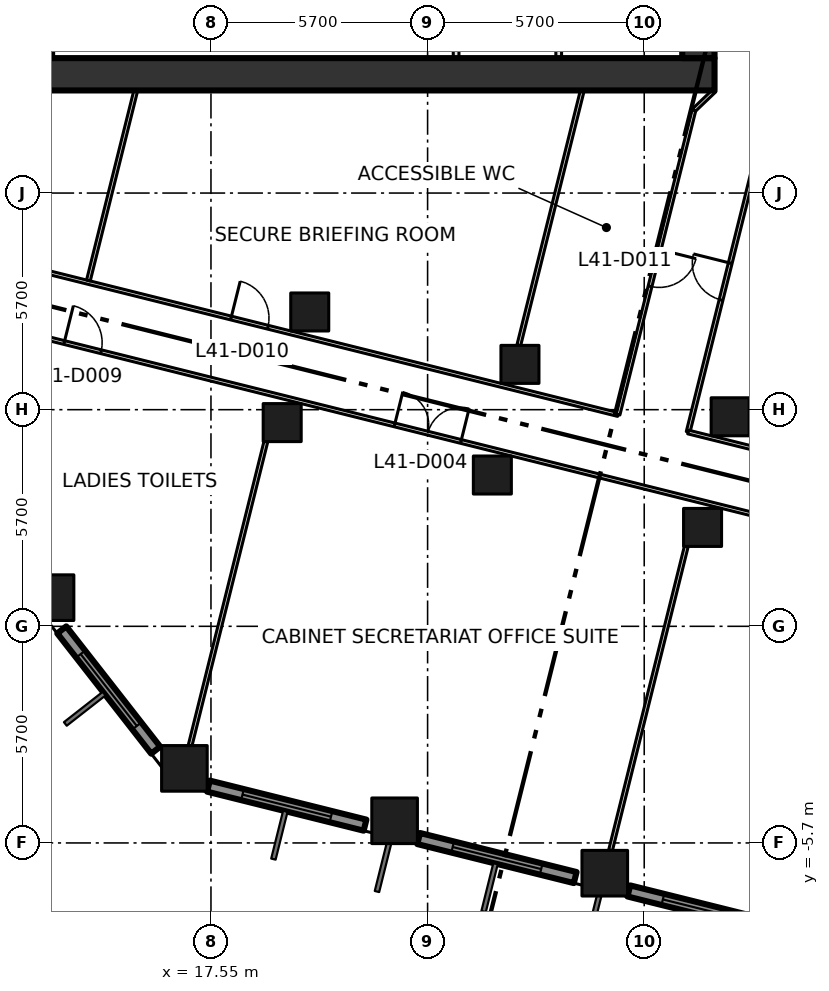
"""IFC4 building model, lengths in metres.
Left out: names, types, materials, properties, quantities, classifications, styles, units other than length and angle.
Written with IfcOpenShell. Run it as: python <this file> out.ifc"""

import sys

from ifc_helpers import new_model, si_unit, direction, frame, frame_2d, origin, origin_2d, place, context, subcontext, project, spatial, rectangle, extrude, element, fill, save


model = new_model("IFC4")
c1 = context("Model", 3, precision=1e-05, world=origin(), true_north=direction((0.0, 1.0)))
c2 = subcontext(c1, "Body", "Model", "MODEL_VIEW")
j1 = project(units=[si_unit("LENGTHUNIT", "METRE"), si_unit("PLANEANGLEUNIT", "RADIAN")], contexts=[c1])
p1 = place(None, origin())
s1 = spatial("IfcSite", under=j1, at=p1, CompositionType="ELEMENT")
p2 = place(p1, origin())
s2 = spatial("IfcBuilding", under=s1, at=p2, CompositionType="ELEMENT")
p3 = place(p2, frame((0.0, 0.0, 182.4)))
s3 = spatial("IfcBuildingStorey", under=s2, at=p3, CompositionType="ELEMENT", Elevation=182.4)
for number, where, z_axis, x_axis in (
    (1, (16.851, -3.738, 0.0), (0.0, 0.0, 1.0), (1.0, 0.0, 0.0)),
    (2, (13.342, 0.754, 0.0), (0.0, 0.0, 1.0), (1.0, 0.0, 0.0)),
    (3, (22.382, -5.117, 0.0), (0.0, 0.0, 1.0), (1.0, 0.0, 0.0)),
    (4, (27.912, -6.496, 0.0), (0.0, 0.0, 1.0), (1.0, 0.0, 0.0)),
):
    element("IfcColumn", number, at=place(p3, frame(where, z_axis=z_axis, x_axis=x_axis)), inside=s3, PredefinedType="COLUMN", context=c2, shape_type="SweptSolid", body=[
        extrude(rectangle(XDim=1.2, YDim=1.2, at=origin_2d()), origin(), (0.0, 0.0, 1.0), 4.2),
    ])
for number, where, z_axis, x_axis in (
    (5, (19.424, 5.36, 0.0), (0.0, 0.0, 1.0), (1.0, 0.0, 0.0)),
    (6, (24.954, 3.981, 0.0), (0.0, 0.0, 1.0), (1.0, 0.0, 0.0)),
    (7, (30.485, 2.602, 0.0), (0.0, 0.0, 1.0), (1.0, 0.0, 0.0)),
    (8, (20.149, 8.271, 0.0), (0.0, 0.0, 1.0), (1.0, 0.0, 0.0)),
    (9, (25.68, 6.892, 0.0), (0.0, 0.0, 1.0), (1.0, 0.0, 0.0)),
    (10, (31.211, 5.513, 0.0), (0.0, 0.0, 1.0), (1.0, 0.0, 0.0)),
):
    element("IfcColumn", number, at=place(p3, frame(where, z_axis=z_axis, x_axis=x_axis)), inside=s3, PredefinedType="COLUMN", context=c2, shape_type="SweptSolid", body=[
        extrude(rectangle(XDim=1.0, YDim=1.0, at=origin_2d()), origin(), (0.0, 0.0, 1.0), 4.2),
    ])
p4 = place(p3, frame((8.0, 14.525, -0.3), z_axis=(0.0, 0.0, 1.0), x_axis=(1.0, 0.0, 0.0)))
e11 = element("IfcWall", 11, at=p4, inside=s3, PredefinedType="SHEAR", context=c2, shape_type="SweptSolid", body=[
    extrude(rectangle(XDim=22.8, YDim=0.85, at=frame_2d((11.4, 0.0))), origin(), (0.0, 0.0, 1.0), 4.2),
])
p5 = place(p4, frame((2.3, 0.0, 0.3)))
e12 = element("IfcOpeningElement", 12, at=p5, cuts=e11, PredefinedType="OPENING", context=c2, shape_type="SweptSolid", body=[
    extrude(rectangle(XDim=1.8, YDim=2.1, at=frame_2d((0.9, 1.05))), frame((0.0, 0.435, 0.0), z_axis=(0.0, -1.0, 0.0), x_axis=(1.0, 0.0, 0.0)), (0.0, 0.0, 1.0), 0.87),
])
p6 = place(p3, frame((30.375, 14.95, -0.3), z_axis=(0.0, 0.0, 1.0), x_axis=(0.0, 1.0, 0.0)))
e13 = element("IfcWall", 13, at=p6, inside=s3, PredefinedType="SHEAR", context=c2, shape_type="SweptSolid", body=[
    extrude(rectangle(XDim=20.75, YDim=0.85, at=frame_2d((10.375, 0.0))), origin(), (0.0, 0.0, 1.0), 4.2),
])
for number, where, z_axis, x_axis in (
    (14, (24.0, 14.95, 0.0), (0.0, 0.0, 1.0), (0.0, 1.0, 0.0)),
    (15, (26.7, 14.95, 0.0), (0.0, 0.0, 1.0), (0.0, 1.0, 0.0)),
):
    element("IfcWall", number, at=place(p3, frame(where, z_axis=z_axis, x_axis=x_axis)), inside=s3, PredefinedType="PARTITIONING", context=c2, shape_type="SweptSolid", body=[
        extrude(rectangle(XDim=2.675, YDim=0.15, at=frame_2d((1.337, 0.0))), origin(), (0.0, 0.0, 1.0), 3.9),
    ])
p7 = place(p3, frame((13.624, -0.094, 0.0), z_axis=(0.0, 0.0, 1.0), x_axis=(0.615526062586, -0.7881165309, 0.0)))
e16 = element("IfcWall", 16, at=p7, inside=s3, PredefinedType="SOLIDWALL", context=c2, shape_type="SweptSolid", body=[
    extrude(rectangle(XDim=4.016, YDim=0.3, at=frame_2d((2.008, 0.0))), origin(), (0.0, 0.0, 1.0), 3.15),
])
p8 = place(p7, frame((0.808, 0.0, 0.8)))
e17 = element("IfcOpeningElement", 17, at=p8, cuts=e16, PredefinedType="OPENING", context=c2, shape_type="SweptSolid", body=[
    extrude(rectangle(XDim=2.4, YDim=2.1, at=frame_2d((1.2, 1.05))), frame((0.0, 0.16, 0.0), z_axis=(0.0, -1.0, 0.0), x_axis=(1.0, 0.0, 0.0)), (0.0, 0.0, 1.0), 0.32),
])
p9 = place(p3, frame((17.484, -4.205, 0.0), z_axis=(0.0, 0.0, 1.0), x_axis=(0.970318118028, -0.241832069473, 0.0)))
e18 = element("IfcWall", 18, at=p9, inside=s3, PredefinedType="SOLIDWALL", context=c2, shape_type="SweptSolid", body=[
    extrude(rectangle(XDim=4.246, YDim=0.3, at=frame_2d((2.123, 0.0))), origin(), (0.0, 0.0, 1.0), 3.15),
])
p10 = place(p9, frame((0.923, 0.0, 0.8)))
e19 = element("IfcOpeningElement", 19, at=p10, cuts=e18, PredefinedType="OPENING", context=c2, shape_type="SweptSolid", body=[
    extrude(rectangle(XDim=2.4, YDim=2.1, at=frame_2d((1.2, 1.05))), frame((0.0, 0.16, 0.0), z_axis=(0.0, -1.0, 0.0), x_axis=(1.0, 0.0, 0.0)), (0.0, 0.0, 1.0), 0.32),
])
p11 = place(p3, frame((23.015, -5.584, 0.0), z_axis=(0.0, 0.0, 1.0), x_axis=(0.970291164166, -0.241940192487, 0.0)))
e20 = element("IfcWall", 20, at=p11, inside=s3, PredefinedType="SOLIDWALL", context=c2, shape_type="SweptSolid", body=[
    extrude(rectangle(XDim=4.245, YDim=0.3, at=frame_2d((2.123, 0.0))), origin(), (0.0, 0.0, 1.0), 3.15),
])
p12 = place(p11, frame((0.922, 0.0, 0.8)))
e21 = element("IfcOpeningElement", 21, at=p12, cuts=e20, PredefinedType="OPENING", context=c2, shape_type="SweptSolid", body=[
    extrude(rectangle(XDim=2.4, YDim=2.1, at=frame_2d((1.2, 1.05))), frame((0.0, 0.16, 0.0), z_axis=(0.0, -1.0, 0.0), x_axis=(1.0, 0.0, 0.0)), (0.0, 0.0, 1.0), 0.32),
])
p13 = place(p3, frame((28.545, -6.963, 0.0), z_axis=(0.0, 0.0, 1.0), x_axis=(0.97030462482, -0.241886202691, 0.0)))
e22 = element("IfcWall", 22, at=p13, inside=s3, PredefinedType="SOLIDWALL", context=c2, shape_type="SweptSolid", body=[
    extrude(rectangle(XDim=4.246, YDim=0.3, at=frame_2d((2.123, 0.0))), origin(), (0.0, 0.0, 1.0), 3.15),
])
p14 = place(p13, frame((0.923, 0.0, 0.8)))
e23 = element("IfcOpeningElement", 23, at=p14, cuts=e22, PredefinedType="OPENING", context=c2, shape_type="SweptSolid", body=[
    extrude(rectangle(XDim=2.4, YDim=2.1, at=frame_2d((1.2, 1.05))), frame((0.0, 0.16, 0.0), z_axis=(0.0, -1.0, 0.0), x_axis=(1.0, 0.0, 0.0)), (0.0, 0.0, 1.0), 0.32),
])
p15 = place(p3, frame((8.565, 8.744, 0.0), z_axis=(0.0, 0.0, 1.0), x_axis=(0.97029693432, -0.24191705035, 0.0)))
e24 = element("IfcWall", 24, at=p15, inside=s3, PredefinedType="PARTITIONING", context=c2, shape_type="SweptSolid", body=[
    extrude(rectangle(XDim=56.375, YDim=0.1, at=frame_2d((28.187, 0.0))), origin(), (0.0, 0.0, 1.0), 3.9),
])
p16 = place(p15, frame((42.739, 0.0, 0.0)))
e25 = element("IfcOpeningElement", 25, at=p16, cuts=e24, PredefinedType="OPENING", context=c2, shape_type="SweptSolid", body=[
    extrude(rectangle(XDim=1.8, YDim=2.1, at=frame_2d((0.9, 1.05))), frame((0.0, 0.06, 0.0), z_axis=(0.0, -1.0, 0.0), x_axis=(1.0, 0.0, 0.0)), (0.0, 0.0, 1.0), 0.12),
])
p17 = place(p15, frame((14.239, 0.0, 0.0)))
e26 = element("IfcOpeningElement", 26, at=p17, cuts=e24, PredefinedType="OPENING", context=c2, shape_type="SweptSolid", body=[
    extrude(rectangle(XDim=1.8, YDim=2.1, at=frame_2d((0.9, 1.05))), frame((0.0, 0.06, 0.0), z_axis=(0.0, -1.0, 0.0), x_axis=(1.0, 0.0, 0.0)), (0.0, 0.0, 1.0), 0.12),
])
p18 = place(p15, frame((29.74, 0.0, 0.0)))
e27 = element("IfcOpeningElement", 27, at=p18, cuts=e24, PredefinedType="OPENING", context=c2, shape_type="SweptSolid", body=[
    extrude(rectangle(XDim=1.8, YDim=2.1, at=frame_2d((0.9, 1.05))), frame((0.0, 0.06, 0.0), z_axis=(0.0, -1.0, 0.0), x_axis=(1.0, 0.0, 0.0)), (0.0, 0.0, 1.0), 0.12),
])
p19 = place(p15, frame((35.64, 0.0, 0.0)))
e28 = element("IfcOpeningElement", 28, at=p19, cuts=e24, PredefinedType="OPENING", context=c2, shape_type="SweptSolid", body=[
    extrude(rectangle(XDim=1.0, YDim=2.1, at=frame_2d((0.5, 1.05))), frame((0.0, 0.06, 0.0), z_axis=(0.0, -1.0, 0.0), x_axis=(1.0, 0.0, 0.0)), (0.0, 0.0, 1.0), 0.12),
])
p20 = place(p15, frame((5.28, 0.0, 0.0)))
e29 = element("IfcOpeningElement", 29, at=p20, cuts=e24, PredefinedType="OPENING", context=c2, shape_type="SweptSolid", body=[
    extrude(rectangle(XDim=1.0, YDim=2.1, at=frame_2d((0.5, 1.05))), frame((0.0, 0.06, 0.0), z_axis=(0.0, -1.0, 0.0), x_axis=(1.0, 0.0, 0.0)), (0.0, 0.0, 1.0), 0.12),
])
p21 = place(p3, frame((8.973, 10.382, 0.0), z_axis=(0.0, 0.0, 1.0), x_axis=(0.970286808807, -0.241957658808, 0.0)))
e30 = element("IfcWall", 30, at=p21, inside=s3, PredefinedType="PARTITIONING", context=c2, shape_type="SweptSolid", body=[
    extrude(rectangle(XDim=19.88, YDim=0.1, at=frame_2d((9.94, 0.0))), origin(), (0.0, 0.0, 1.0), 3.9),
])
p22 = place(p21, frame((9.384, 0.0, 0.0)))
e31 = element("IfcOpeningElement", 31, at=p22, cuts=e30, PredefinedType="OPENING", context=c2, shape_type="SweptSolid", body=[
    extrude(rectangle(XDim=1.0, YDim=2.1, at=frame_2d((0.5, 1.05))), frame((0.0, 0.06, 0.0), z_axis=(0.0, -1.0, 0.0), x_axis=(1.0, 0.0, 0.0)), (0.0, 0.0, 1.0), 0.12),
])
p23 = place(p3, frame((30.105, 5.113, 0.0), z_axis=(0.0, 0.0, 1.0), x_axis=(0.241984285369, 0.970280168629, 0.0)))
e32 = element("IfcWall", 32, at=p23, inside=s3, PredefinedType="PARTITIONING", context=c2, shape_type="SweptSolid", body=[
    extrude(rectangle(XDim=8.232, YDim=0.1, at=frame_2d((4.116, 0.0))), origin(), (0.0, 0.0, 1.0), 3.9),
])
p24 = place(p23, frame((3.58, 0.0, 0.0)))
e33 = element("IfcOpeningElement", 33, at=p24, cuts=e32, PredefinedType="OPENING", context=c2, shape_type="SweptSolid", body=[
    extrude(rectangle(XDim=1.0, YDim=2.1, at=frame_2d((0.5, 1.05))), frame((0.0, 0.06, 0.0), z_axis=(0.0, -1.0, 0.0), x_axis=(1.0, 0.0, 0.0)), (0.0, 0.0, 1.0), 0.12),
])
p25 = place(p3, frame((30.259, 13.583, 0.0), z_axis=(0.0, 0.0, 1.0), x_axis=(-0.241888494143, -0.970304053584, 0.0)))
e34 = element("IfcWall", 34, at=p25, inside=s3, PredefinedType="PARTITIONING", context=c2, shape_type="SweptSolid", body=[
    extrude(rectangle(XDim=8.256, YDim=0.1, at=frame_2d((4.128, 0.0))), origin(), (0.0, 0.0, 1.0), 3.9),
])
p26 = place(p25, frame((3.78, 0.0, 0.0)))
e35 = element("IfcOpeningElement", 35, at=p26, cuts=e34, PredefinedType="OPENING", context=c2, shape_type="SweptSolid", body=[
    extrude(rectangle(XDim=1.0, YDim=2.1, at=frame_2d((0.5, 1.05))), frame((0.0, 0.06, 0.0), z_axis=(0.0, -1.0, 0.0), x_axis=(1.0, 0.0, 0.0)), (0.0, 0.0, 1.0), 0.12),
])
p27 = place(p3, frame((30.8, 14.1, 0.0), z_axis=(0.0, 0.0, 1.0), x_axis=(-0.722911025189, -0.690941133281, 0.0)))
e36 = element("IfcWall", 36, at=p27, inside=s3, PredefinedType="PARTITIONING", context=c2, shape_type="SweptSolid", body=[
    extrude(rectangle(XDim=0.748, YDim=0.1, at=frame_2d((0.374, 0.0))), origin(), (0.0, 0.0, 1.0), 3.9),
])
p28 = place(p3, frame((49.536, 0.268, 0.0), z_axis=(0.0, 0.0, 1.0), x_axis=(-0.970292195994, 0.241936054348, 0.0)))
e37 = element("IfcWall", 37, at=p28, inside=s3, PredefinedType="PARTITIONING", context=c2, shape_type="SweptSolid", body=[
    extrude(rectangle(XDim=20.026, YDim=0.1, at=frame_2d((10.013, 0.0))), origin(), (0.0, 0.0, 1.0), 3.9),
])
p29 = place(p28, frame((9.18, 0.0, 0.0)))
e38 = element("IfcOpeningElement", 38, at=p29, cuts=e37, PredefinedType="OPENING", context=c2, shape_type="SweptSolid", body=[
    extrude(rectangle(XDim=1.8, YDim=2.1, at=frame_2d((0.9, 1.05))), frame((0.0, 0.06, 0.0), z_axis=(0.0, -1.0, 0.0), x_axis=(1.0, 0.0, 0.0)), (0.0, 0.0, 1.0), 0.12),
])
p30 = place(p3, frame((14.325, 9.099, 0.0), z_axis=(0.0, 0.0, 1.0), x_axis=(0.241956019685, 0.970287217548, 0.0)))
e39 = element("IfcWall", 39, at=p30, inside=s3, PredefinedType="PARTITIONING", context=c2, shape_type="SweptSolid", body=[
    extrude(rectangle(XDim=5.154, YDim=0.1, at=frame_2d((2.577, 0.0))), origin(), (0.0, 0.0, 1.0), 3.9),
])
p31 = place(p3, frame((17.001, -3.138, 0.0), z_axis=(0.0, 0.0, 1.0), x_axis=(0.241922303467, 0.970295624583, 0.0)))
e40 = element("IfcWall", 40, at=p31, inside=s3, PredefinedType="PARTITIONING", context=c2, shape_type="SweptSolid", body=[
    extrude(rectangle(XDim=8.243, YDim=0.1, at=frame_2d((4.122, 0.0))), origin(), (0.0, 0.0, 1.0), 3.9),
])
p32 = place(p3, frame((25.649, 7.392, 0.0), z_axis=(0.0, 0.0, 1.0), x_axis=(0.241870819599, 0.970308459525, 0.0)))
e41 = element("IfcWall", 41, at=p32, inside=s3, PredefinedType="PARTITIONING", context=c2, shape_type="SweptSolid", body=[
    extrude(rectangle(XDim=6.913, YDim=0.1, at=frame_2d((3.457, 0.0))), origin(), (0.0, 0.0, 1.0), 3.9),
])
p33 = place(p3, frame((28.063, -5.896, 0.0), z_axis=(0.0, 0.0, 1.0), x_axis=(0.241894418317, 0.970302576719, 0.0)))
e42 = element("IfcWall", 42, at=p33, inside=s3, PredefinedType="PARTITIONING", context=c2, shape_type="SweptSolid", body=[
    extrude(rectangle(XDim=8.243, YDim=0.1, at=frame_2d((4.122, 0.0))), origin(), (0.0, 0.0, 1.0), 3.9),
])
p34 = place(p8, origin())
e43 = element("IfcWindow", 43, at=p34, inside=s3, PartitioningType="DOUBLE_PANEL_VERTICAL", PredefinedType="WINDOW", context=c2, shape_type="SweptSolid", body=[
    extrude(rectangle(XDim=2.4, YDim=2.1, at=frame_2d((1.2, 1.05))), frame((0.0, 0.03, 0.0), z_axis=(0.0, -1.0, 0.0), x_axis=(1.0, 0.0, 0.0)), (0.0, 0.0, 1.0), 0.06),
])
fill(e17, e43)
p35 = place(p10, origin())
e44 = element("IfcWindow", 44, at=p35, inside=s3, PartitioningType="DOUBLE_PANEL_VERTICAL", PredefinedType="WINDOW", context=c2, shape_type="SweptSolid", body=[
    extrude(rectangle(XDim=2.4, YDim=2.1, at=frame_2d((1.2, 1.05))), frame((0.0, 0.03, 0.0), z_axis=(0.0, -1.0, 0.0), x_axis=(1.0, 0.0, 0.0)), (0.0, 0.0, 1.0), 0.06),
])
fill(e19, e44)
p36 = place(p12, origin())
e45 = element("IfcWindow", 45, at=p36, inside=s3, PartitioningType="DOUBLE_PANEL_VERTICAL", PredefinedType="WINDOW", context=c2, shape_type="SweptSolid", body=[
    extrude(rectangle(XDim=2.4, YDim=2.1, at=frame_2d((1.2, 1.05))), frame((0.0, 0.03, 0.0), z_axis=(0.0, -1.0, 0.0), x_axis=(1.0, 0.0, 0.0)), (0.0, 0.0, 1.0), 0.06),
])
fill(e21, e45)
p37 = place(p14, origin())
e46 = element("IfcWindow", 46, at=p37, inside=s3, PartitioningType="DOUBLE_PANEL_VERTICAL", PredefinedType="WINDOW", context=c2, shape_type="SweptSolid", body=[
    extrude(rectangle(XDim=2.4, YDim=2.1, at=frame_2d((1.2, 1.05))), frame((0.0, 0.03, 0.0), z_axis=(0.0, -1.0, 0.0), x_axis=(1.0, 0.0, 0.0)), (0.0, 0.0, 1.0), 0.06),
])
fill(e23, e46)
p38 = place(p17, origin())
e47 = element("IfcDoor", 47, at=p38, inside=s3, OperationType="DOUBLE_DOOR_SINGLE_SWING", PredefinedType="DOOR", context=c2, shape_type="SweptSolid", body=[
    extrude(rectangle(XDim=1.8, YDim=2.1, at=frame_2d((0.9, 1.05))), frame((0.0, 0.025, 0.0), z_axis=(0.0, -1.0, 0.0), x_axis=(1.0, 0.0, 0.0)), (0.0, 0.0, 1.0), 0.05),
])
fill(e26, e47)
p39 = place(p20, origin())
e48 = element("IfcDoor", 48, at=p39, inside=s3, OperationType="SINGLE_SWING_LEFT", PredefinedType="DOOR", context=c2, shape_type="SweptSolid", body=[
    extrude(rectangle(XDim=1.0, YDim=2.1, at=frame_2d((0.5, 1.05))), frame((0.0, 0.025, 0.0), z_axis=(0.0, -1.0, 0.0), x_axis=(1.0, 0.0, 0.0)), (0.0, 0.0, 1.0), 0.05),
])
fill(e29, e48)
p40 = place(p22, origin())
e49 = element("IfcDoor", 49, at=p40, inside=s3, OperationType="SINGLE_SWING_LEFT", PredefinedType="DOOR", context=c2, shape_type="SweptSolid", body=[
    extrude(rectangle(XDim=1.0, YDim=2.1, at=frame_2d((0.5, 1.05))), frame((0.0, 0.025, 0.0), z_axis=(0.0, -1.0, 0.0), x_axis=(1.0, 0.0, 0.0)), (0.0, 0.0, 1.0), 0.05),
])
fill(e31, e49)
p41 = place(p26, origin())
e50 = element("IfcDoor", 50, at=p41, inside=s3, OperationType="SINGLE_SWING_LEFT", PredefinedType="DOOR", context=c2, shape_type="SweptSolid", body=[
    extrude(rectangle(XDim=1.0, YDim=2.1, at=frame_2d((0.5, 1.05))), frame((0.0, 0.025, 0.0), z_axis=(0.0, -1.0, 0.0), x_axis=(1.0, 0.0, 0.0)), (0.0, 0.0, 1.0), 0.05),
])
fill(e35, e50)
p42 = place(p24, origin())
e51 = element("IfcDoor", 51, at=p42, inside=s3, OperationType="SINGLE_SWING_RIGHT", PredefinedType="DOOR", context=c2, shape_type="SweptSolid", body=[
    extrude(rectangle(XDim=1.0, YDim=2.1, at=frame_2d((0.5, 1.05))), frame((0.0, 0.025, 0.0), z_axis=(0.0, -1.0, 0.0), x_axis=(1.0, 0.0, 0.0)), (0.0, 0.0, 1.0), 0.05),
])
fill(e33, e51)
save(model, sys.argv[1])
